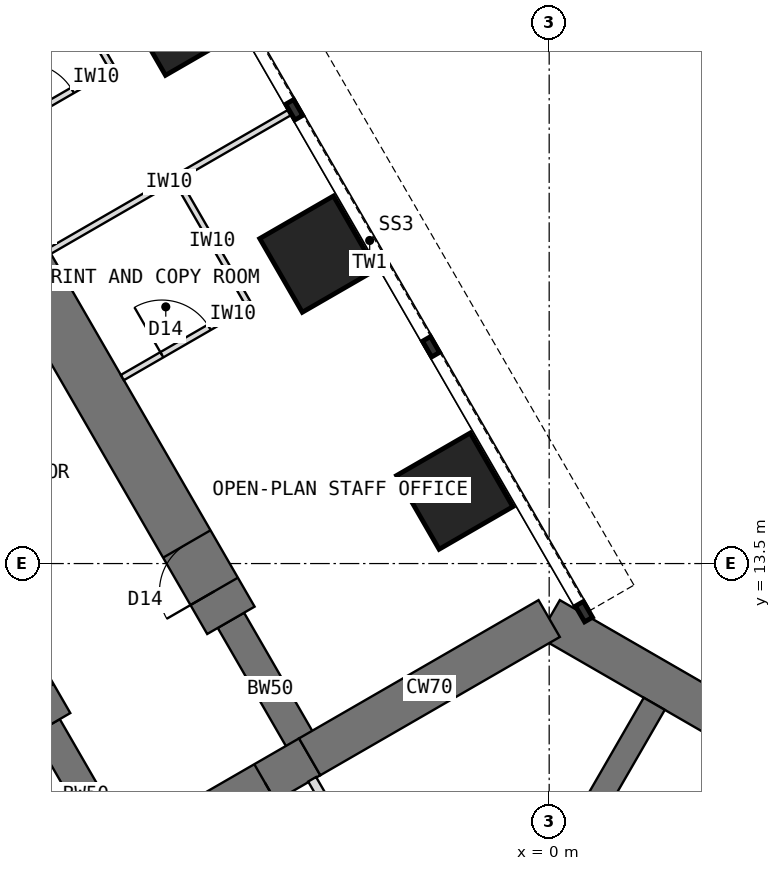
"""IFC4 building model, lengths in metres.
Left out: names, types, materials, properties, quantities, classifications, styles, units other than length and angle.
Written with IfcOpenShell. Run it as: python <this file> out.ifc"""

import sys

from ifc_helpers import new_model, si_unit, direction, frame, frame_2d, origin, origin_2d, place, context, subcontext, project, spatial, rectangle, extrude, element, fill, save


model = new_model("IFC4")
c1 = context("Model", 3, precision=1e-05, world=origin(), true_north=direction((0.0, 1.0)))
c2 = subcontext(c1, "Body", "Model", "MODEL_VIEW")
j1 = project(units=[si_unit("LENGTHUNIT", "METRE"), si_unit("PLANEANGLEUNIT", "RADIAN")], contexts=[c1])
p1 = place(None, origin())
s1 = spatial("IfcSite", under=j1, at=p1, CompositionType="ELEMENT")
p2 = place(p1, origin())
s2 = spatial("IfcBuilding", under=s1, at=p2, CompositionType="ELEMENT")
p3 = place(p2, frame((0.0, 0.0, 72.5)))
s3 = spatial("IfcBuildingStorey", under=s2, at=p3, CompositionType="ELEMENT", Elevation=72.5)
p4 = place(p3, frame((10.908, 6.298, 0.0), z_axis=(0.0, 0.0, 1.0), x_axis=(-0.866021940709, 0.500005998175, 0.0)))
e1 = element("IfcWall", 1, at=p4, inside=s3, PredefinedType="SHEAR", context=c2, shape_type="SweptSolid", body=[
    extrude(rectangle(XDim=12.596, YDim=0.7, at=frame_2d((6.298, 0.0))), origin(), (0.0, 0.0, 1.0), 4.0),
])
p5 = place(p3, frame((0.0, 12.596, 0.0), z_axis=(0.0, 0.0, 1.0), x_axis=(-0.866011268655, -0.500024481964, 0.0)))
e2 = element("IfcWall", 2, at=p5, inside=s3, PredefinedType="SHEAR", context=c2, shape_type="SweptSolid", body=[
    extrude(rectangle(XDim=4.548, YDim=0.7, at=frame_2d((2.274, 0.0))), origin(), (0.0, 0.0, 1.0), 4.0),
])
p6 = place(p3, frame((-3.939, 10.322, 0.0), z_axis=(0.0, 0.0, 1.0), x_axis=(-0.866019471182, -0.500010275428, 0.0)))
e3 = element("IfcWall", 3, at=p6, inside=s3, PredefinedType="SHEAR", context=c2, shape_type="SweptSolid", body=[
    extrude(rectangle(XDim=3.5, YDim=0.7, at=frame_2d((1.75, 0.0))), origin(), (0.0, 0.0, 1.0), 4.0),
])
p7 = place(p6, frame((0.85, 0.0, 0.0)))
e4 = element("IfcOpeningElement", 4, at=p7, cuts=e3, PredefinedType="OPENING", context=c2, shape_type="SweptSolid", body=[
    extrude(rectangle(XDim=1.8, YDim=2.1, at=frame_2d((0.9, 1.05))), frame((0.0, 0.36, 0.0), z_axis=(0.0, -1.0, 0.0), x_axis=(1.0, 0.0, 0.0)), (0.0, 0.0, 1.0), 0.72),
])
p8 = place(p3, frame((-6.97, 8.572, 0.0), z_axis=(0.0, 0.0, 1.0), x_axis=(-0.499988811324, 0.866031863473, 0.0)))
e5 = element("IfcWall", 5, at=p8, inside=s3, PredefinedType="SHEAR", context=c2, shape_type="SweptSolid", body=[
    extrude(rectangle(XDim=2.592, YDim=0.5, at=frame_2d((1.296, 0.0))), origin(), (0.0, 0.0, 1.0), 4.0),
])
p9 = place(p3, frame((-8.266, 10.816, 0.0), z_axis=(0.0, 0.0, 1.0), x_axis=(-0.499996231654, 0.866027579429, 0.0)))
e6 = element("IfcWall", 6, at=p9, inside=s3, PredefinedType="SHEAR", context=c2, shape_type="SweptSolid", body=[
    extrude(rectangle(XDim=13.2, YDim=0.9, at=frame_2d((6.6, 0.0))), origin(), (0.0, 0.0, 1.0), 4.0),
])
p10 = place(p9, frame((0.55, 0.0, 0.0)))
e7 = element("IfcOpeningElement", 7, at=p10, cuts=e6, PredefinedType="OPENING", context=c2, shape_type="SweptSolid", body=[
    extrude(rectangle(XDim=0.9, YDim=2.1, at=frame_2d((0.45, 1.05))), frame((0.0, 0.46, 0.0), z_axis=(0.0, -1.0, 0.0), x_axis=(1.0, 0.0, 0.0)), (0.0, 0.0, 1.0), 0.92),
])
p11 = place(p9, frame((7.3, 0.0, 0.0)))
e8 = element("IfcOpeningElement", 8, at=p11, cuts=e6, PredefinedType="OPENING", context=c2, shape_type="SweptSolid", body=[
    extrude(rectangle(XDim=0.9, YDim=2.1, at=frame_2d((0.45, 1.05))), frame((0.0, 0.46, 0.0), z_axis=(0.0, -1.0, 0.0), x_axis=(1.0, 0.0, 0.0)), (0.0, 0.0, 1.0), 0.92),
])
p12 = place(p3, frame((-3.939, 10.322, 0.0), z_axis=(0.0, 0.0, 1.0), x_axis=(-0.499918158782, 0.866072649678, 0.0)))
e9 = element("IfcWall", 9, at=p12, inside=s3, PredefinedType="SHEAR", context=c2, shape_type="SweptSolid", body=[
    extrude(rectangle(XDim=2.592, YDim=0.5, at=frame_2d((1.296, 0.0))), origin(), (0.0, 0.0, 1.0), 4.0),
])
p13 = place(p3, frame((-5.234, 12.566, 0.0), z_axis=(0.0, 0.0, 1.0), x_axis=(-0.500010103361, 0.866019570528, 0.0)))
e10 = element("IfcWall", 10, at=p13, inside=s3, PredefinedType="SHEAR", context=c2, shape_type="SweptSolid", body=[
    extrude(rectangle(XDim=13.2, YDim=0.9, at=frame_2d((6.6, 0.0))), origin(), (0.0, 0.0, 1.0), 4.0),
])
p14 = place(p13, frame((0.55, 0.0, 0.0)))
e11 = element("IfcOpeningElement", 11, at=p14, cuts=e10, PredefinedType="OPENING", context=c2, shape_type="SweptSolid", body=[
    extrude(rectangle(XDim=0.9, YDim=2.1, at=frame_2d((0.45, 1.05))), frame((0.0, 0.46, 0.0), z_axis=(0.0, -1.0, 0.0), x_axis=(1.0, 0.0, 0.0)), (0.0, 0.0, 1.0), 0.92),
])
p15 = place(p13, frame((7.3, 0.0, 0.0)))
e12 = element("IfcOpeningElement", 12, at=p15, cuts=e10, PredefinedType="OPENING", context=c2, shape_type="SweptSolid", body=[
    extrude(rectangle(XDim=0.9, YDim=2.1, at=frame_2d((0.45, 1.05))), frame((0.0, 0.46, 0.0), z_axis=(0.0, -1.0, 0.0), x_axis=(1.0, 0.0, 0.0)), (0.0, 0.0, 1.0), 0.92),
])
for number, where, z_axis, x_axis in (
    (13, (-1.554, 14.691, 0.0), (0.0, 0.0, 1.0), (0.866, 0.5, 0.0)),
    (14, (-3.804, 18.588, 0.0), (0.0, 0.0, 1.0), (0.866, 0.5, 0.0)),
    (15, (-6.054, 22.486, 0.0), (0.0, 0.0, 1.0), (0.866, 0.5, 0.0)),
):
    element("IfcColumn", number, at=place(p3, frame(where, z_axis=z_axis, x_axis=x_axis)), inside=s3, PredefinedType="COLUMN", context=c2, shape_type="SweptSolid", body=[
        extrude(rectangle(XDim=1.4, YDim=1.4, at=origin_2d()), origin(), (0.0, 0.0, 1.0), 4.0),
    ])
p16 = place(p3, frame((-1.201, 6.12, 0.0), z_axis=(0.0, 0.0, 1.0), x_axis=(0.500002627198, 0.866023886965, 0.0)))
e16 = element("IfcWall", 16, at=p16, inside=s3, PredefinedType="SHEAR", context=c2, shape_type="SweptSolid", body=[
    extrude(rectangle(XDim=5.858, YDim=0.4, at=frame_2d((2.929, 0.0))), origin(), (0.0, 0.0, 1.0), 4.0),
])
p17 = place(p3, frame((-8.22, 18.637, 0.0), z_axis=(0.0, 0.0, 1.0), x_axis=(0.866012237902, 0.500022803284, 0.0)))
e17 = element("IfcWall", 17, at=p17, inside=s3, PredefinedType="PARTITIONING", context=c2, shape_type="SweptSolid", body=[
    extrude(rectangle(XDim=4.55, YDim=0.1, at=frame_2d((2.275, 0.0))), origin(), (0.0, 0.0, 1.0), 3.8),
])
p18 = place(p3, frame((-4.941, 17.759, 0.0), z_axis=(0.0, 0.0, 1.0), x_axis=(-0.500077600433, 0.865980596518, 0.0)))
e18 = element("IfcWall", 18, at=p18, inside=s3, PredefinedType="PARTITIONING", context=c2, shape_type="SweptSolid", body=[
    extrude(rectangle(XDim=2.4, YDim=0.1, at=frame_2d((1.2, 0.0))), origin(), (0.0, 0.0, 1.0), 3.8),
])
p19 = place(p3, frame((-7.02, 16.559, 0.0), z_axis=(0.0, 0.0, 1.0), x_axis=(0.866050077142, 0.499957262057, 0.0)))
e19 = element("IfcWall", 19, at=p19, inside=s3, PredefinedType="PARTITIONING", context=c2, shape_type="SweptSolid", body=[
    extrude(rectangle(XDim=2.4, YDim=0.1, at=frame_2d((1.2, 0.0))), origin(), (0.0, 0.0, 1.0), 3.8),
])
p20 = place(p19, frame((0.75, 0.0, 0.0)))
e20 = element("IfcOpeningElement", 20, at=p20, cuts=e19, PredefinedType="OPENING", context=c2, shape_type="SweptSolid", body=[
    extrude(rectangle(XDim=0.9, YDim=2.1, at=frame_2d((0.45, 1.05))), frame((0.0, 0.06, 0.0), z_axis=(0.0, -1.0, 0.0), x_axis=(1.0, 0.0, 0.0)), (0.0, 0.0, 1.0), 0.12),
])
p21 = place(p3, frame((-7.191, 21.656, 0.0), z_axis=(0.0, 0.0, 1.0), x_axis=(-0.500077600433, 0.865980596518, 0.0)))
e21 = element("IfcWall", 21, at=p21, inside=s3, PredefinedType="PARTITIONING", context=c2, shape_type="SweptSolid", body=[
    extrude(rectangle(XDim=2.4, YDim=0.1, at=frame_2d((1.2, 0.0))), origin(), (0.0, 0.0, 1.0), 3.8),
])
p22 = place(p3, frame((-9.27, 20.456, 0.0), z_axis=(0.0, 0.0, 1.0), x_axis=(0.866006032174, 0.500033551112, 0.0)))
e22 = element("IfcWall", 22, at=p22, inside=s3, PredefinedType="PARTITIONING", context=c2, shape_type="SweptSolid", body=[
    extrude(rectangle(XDim=2.4, YDim=0.1, at=frame_2d((1.2, 0.0))), origin(), (0.0, 0.0, 1.0), 3.8),
])
p23 = place(p22, frame((0.75, 0.0, 0.0)))
e23 = element("IfcOpeningElement", 23, at=p23, cuts=e22, PredefinedType="OPENING", context=c2, shape_type="SweptSolid", body=[
    extrude(rectangle(XDim=0.9, YDim=2.1, at=frame_2d((0.45, 1.05))), frame((0.0, 0.06, 0.0), z_axis=(0.0, -1.0, 0.0), x_axis=(1.0, 0.0, 0.0)), (0.0, 0.0, 1.0), 0.12),
])
p24 = place(p3, frame((-3.898, 9.952, 0.0), z_axis=(0.0, 0.0, 1.0), x_axis=(0.499999927604, -0.866025445582, 0.0)))
e24 = element("IfcWall", 24, at=p24, inside=s3, PredefinedType="PARTITIONING", context=c2, shape_type="SweptSolid", body=[
    extrude(rectangle(XDim=4.468, YDim=0.15, at=frame_2d((2.234, 0.0))), origin(), (0.0, 0.0, 1.0), 3.8),
])
p25 = place(p24, frame((1.724, 0.0, 0.0)))
e25 = element("IfcOpeningElement", 25, at=p25, cuts=e24, PredefinedType="OPENING", context=c2, shape_type="SweptSolid", body=[
    extrude(rectangle(XDim=1.0, YDim=2.1, at=frame_2d((0.5, 1.05))), frame((0.0, 0.085, 0.0), z_axis=(0.0, -1.0, 0.0), x_axis=(1.0, 0.0, 0.0)), (0.0, 0.0, 1.0), 0.17),
])
p26 = place(p7, origin())
e26 = element("IfcDoor", 26, at=p26, inside=s3, OperationType="DOUBLE_DOOR_DOUBLE_SWING", PredefinedType="DOOR", context=c2, shape_type="SweptSolid", body=[
    extrude(rectangle(XDim=1.72, YDim=2.06, at=frame_2d((0.9, 1.03))), frame((0.0, 0.025, 0.0), z_axis=(0.0, -1.0, 0.0), x_axis=(1.0, 0.0, 0.0)), (0.0, 0.0, 1.0), 0.05),
    extrude(rectangle(XDim=0.04, YDim=2.1, at=frame_2d((0.02, 1.05))), frame((0.0, 0.35, 0.0), z_axis=(0.0, -1.0, 0.0), x_axis=(1.0, 0.0, 0.0)), (0.0, 0.0, 1.0), 0.699),
    extrude(rectangle(XDim=0.04, YDim=2.1, at=frame_2d((1.78, 1.05))), frame((0.0, 0.35, 0.0), z_axis=(0.0, -1.0, 0.0), x_axis=(1.0, 0.0, 0.0)), (0.0, 0.0, 1.0), 0.699),
    extrude(rectangle(XDim=1.72, YDim=0.04, at=frame_2d((0.9, 2.08))), frame((0.0, 0.35, 0.0), z_axis=(0.0, -1.0, 0.0), x_axis=(1.0, 0.0, 0.0)), (0.0, 0.0, 1.0), 0.699),
])
fill(e4, e26)
p27 = place(p20, origin())
e27 = element("IfcDoor", 27, at=p27, inside=s3, OperationType="SINGLE_SWING_LEFT", PredefinedType="DOOR", context=c2, shape_type="SweptSolid", body=[
    extrude(rectangle(XDim=0.9, YDim=2.1, at=frame_2d((0.45, 1.05))), frame((0.0, 0.025, 0.0), z_axis=(0.0, -1.0, 0.0), x_axis=(1.0, 0.0, 0.0)), (0.0, 0.0, 1.0), 0.05),
])
fill(e20, e27)
p28 = place(p23, origin())
e28 = element("IfcDoor", 28, at=p28, inside=s3, OperationType="SINGLE_SWING_LEFT", PredefinedType="DOOR", context=c2, shape_type="SweptSolid", body=[
    extrude(rectangle(XDim=0.9, YDim=2.1, at=frame_2d((0.45, 1.05))), frame((0.0, 0.025, 0.0), z_axis=(0.0, -1.0, 0.0), x_axis=(1.0, 0.0, 0.0)), (0.0, 0.0, 1.0), 0.05),
])
fill(e23, e28)
p29 = place(p10, origin())
e29 = element("IfcDoor", 29, at=p29, inside=s3, OperationType="SINGLE_SWING_LEFT", PredefinedType="DOOR", context=c2, shape_type="SweptSolid", body=[
    extrude(rectangle(XDim=0.82, YDim=2.06, at=frame_2d((0.45, 1.03))), frame((0.0, 0.025, 0.0), z_axis=(0.0, -1.0, 0.0), x_axis=(1.0, 0.0, 0.0)), (0.0, 0.0, 1.0), 0.05),
    extrude(rectangle(XDim=0.04, YDim=2.1, at=frame_2d((0.02, 1.05))), frame((0.0, 0.45, 0.0), z_axis=(0.0, -1.0, 0.0), x_axis=(1.0, 0.0, 0.0)), (0.0, 0.0, 1.0), 0.899),
    extrude(rectangle(XDim=0.04, YDim=2.1, at=frame_2d((0.88, 1.05))), frame((0.0, 0.45, 0.0), z_axis=(0.0, -1.0, 0.0), x_axis=(1.0, 0.0, 0.0)), (0.0, 0.0, 1.0), 0.899),
    extrude(rectangle(XDim=0.82, YDim=0.04, at=frame_2d((0.45, 2.08))), frame((0.0, 0.45, 0.0), z_axis=(0.0, -1.0, 0.0), x_axis=(1.0, 0.0, 0.0)), (0.0, 0.0, 1.0), 0.899),
])
fill(e7, e29)
p30 = place(p14, origin())
e30 = element("IfcDoor", 30, at=p30, inside=s3, OperationType="SINGLE_SWING_LEFT", PredefinedType="DOOR", context=c2, shape_type="SweptSolid", body=[
    extrude(rectangle(XDim=0.82, YDim=2.06, at=frame_2d((0.45, 1.03))), frame((0.0, 0.025, 0.0), z_axis=(0.0, -1.0, 0.0), x_axis=(1.0, 0.0, 0.0)), (0.0, 0.0, 1.0), 0.05),
    extrude(rectangle(XDim=0.04, YDim=2.1, at=frame_2d((0.02, 1.05))), frame((0.0, 0.45, 0.0), z_axis=(0.0, -1.0, 0.0), x_axis=(1.0, 0.0, 0.0)), (0.0, 0.0, 1.0), 0.899),
    extrude(rectangle(XDim=0.04, YDim=2.1, at=frame_2d((0.88, 1.05))), frame((0.0, 0.45, 0.0), z_axis=(0.0, -1.0, 0.0), x_axis=(1.0, 0.0, 0.0)), (0.0, 0.0, 1.0), 0.899),
    extrude(rectangle(XDim=0.82, YDim=0.04, at=frame_2d((0.45, 2.08))), frame((0.0, 0.45, 0.0), z_axis=(0.0, -1.0, 0.0), x_axis=(1.0, 0.0, 0.0)), (0.0, 0.0, 1.0), 0.899),
])
fill(e11, e30)
save(model, sys.argv[1])
